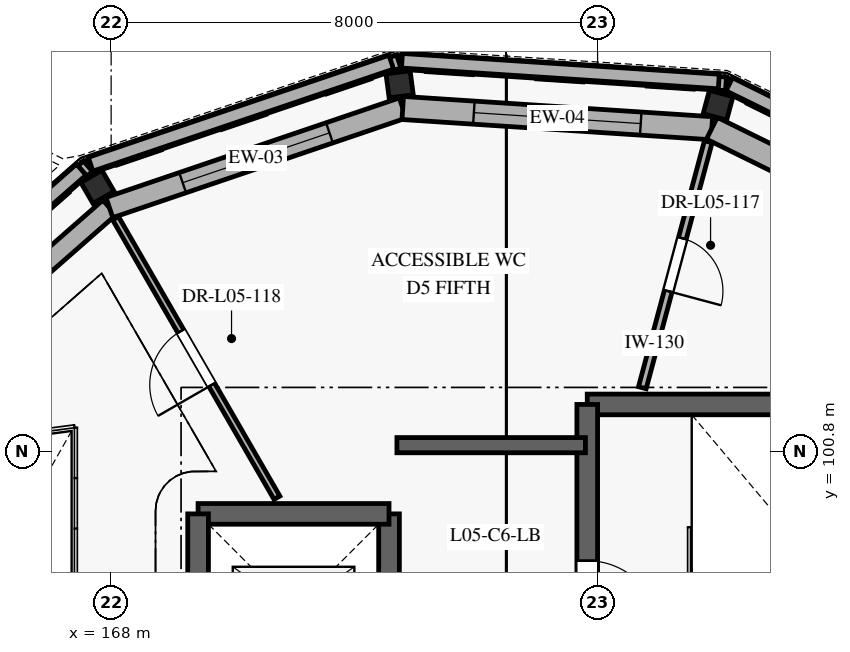
"""IFC4 building model, lengths in metres.
Left out: names, types, materials, properties, quantities, classifications, styles, units other than length and angle.
Written with IfcOpenShell. Run it as: python <this file> out.ifc"""

import sys

from ifc_helpers import new_model, si_unit, direction, frame, frame_2d, origin, origin_2d, place, context, subcontext, project, spatial, rectangle, extrude, element, fill, save


model = new_model("IFC4")
c1 = context("Model", 3, precision=1e-05, world=origin(), true_north=direction((0.0, 1.0)))
c2 = subcontext(c1, "Body", "Model", "MODEL_VIEW")
j1 = project(units=[si_unit("LENGTHUNIT", "METRE"), si_unit("PLANEANGLEUNIT", "RADIAN")], contexts=[c1])
p1 = place(None, origin())
s1 = spatial("IfcSite", under=j1, at=p1, CompositionType="ELEMENT")
p2 = place(p1, origin())
s2 = spatial("IfcBuilding", under=s1, at=p2, CompositionType="ELEMENT")
p3 = place(p2, frame((0.0, 0.0, 20.8)))
s3 = spatial("IfcBuildingStorey", under=s2, at=p3, CompositionType="ELEMENT", Elevation=20.8)
for number, where, z_axis, x_axis in (
    (1, (177.981, 106.492, 0.0), (0.0, 0.0, 1.0), (-0.966, 0.259, 0.0)),
    (2, (172.744, 106.835, 0.0), (0.0, 0.0, 1.0), (-0.991, -0.131, 0.0)),
    (3, (167.775, 105.148, 0.0), (0.0, 0.0, 1.0), (-0.866, -0.5, 0.0)),
):
    element("IfcColumn", number, at=place(p3, frame(where, z_axis=z_axis, x_axis=x_axis)), inside=s3, PredefinedType="COLUMN", context=c2, shape_type="SweptSolid", body=[
        extrude(rectangle(XDim=0.4, YDim=0.4, at=origin_2d()), origin(), (0.0, 0.0, 1.0), 4.0),
    ])
p4 = place(p3, frame((164.141, 101.449, 0.0), z_axis=(0.0, 0.0, 1.0), x_axis=(0.751857877577, 0.659325209533, 0.0)))
e4 = element("IfcWall", 4, at=p4, inside=s3, PredefinedType="SOLIDWALL", context=c2, shape_type="SweptSolid", body=[
    extrude(rectangle(XDim=5.095, YDim=0.325, at=frame_2d((2.547, 0.0))), origin(), (0.0, 0.0, 1.0), 3.74),
])
p5 = place(p4, frame((1.372, 0.0, 0.85)))
e5 = element("IfcOpeningElement", 5, at=p5, cuts=e4, PredefinedType="OPENING", context=c2, shape_type="SweptSolid", body=[
    extrude(rectangle(XDim=2.35, YDim=1.8, at=frame_2d((1.175, 0.9))), frame((0.0, 0.172, 0.0), z_axis=(0.0, -1.0, 0.0), x_axis=(1.0, 0.0, 0.0)), (0.0, 0.0, 1.0), 0.345),
])
p6 = place(p3, frame((167.971, 104.808, 0.0), z_axis=(0.0, 0.0, 1.0), x_axis=(0.946944067006, 0.321398403796, 0.0)))
e6 = element("IfcWall", 6, at=p6, inside=s3, PredefinedType="SOLIDWALL", context=c2, shape_type="SweptSolid", body=[
    extrude(rectangle(XDim=5.095, YDim=0.35, at=frame_2d((2.547, 0.0))), origin(), (0.0, 0.0, 1.0), 3.74),
])
p7 = place(p6, frame((1.272, 0.0, 0.85)))
e7 = element("IfcOpeningElement", 7, at=p7, cuts=e6, PredefinedType="OPENING", context=c2, shape_type="SweptSolid", body=[
    extrude(rectangle(XDim=2.55, YDim=1.8, at=frame_2d((1.275, 0.9))), frame((0.0, 0.185, 0.0), z_axis=(0.0, -1.0, 0.0), x_axis=(1.0, 0.0, 0.0)), (0.0, 0.0, 1.0), 0.37),
])
p8 = place(p3, frame((172.796, 106.446, 0.0), z_axis=(0.0, 0.0, 1.0), x_axis=(0.99786146052, -0.065364406289, 0.0)))
e8 = element("IfcWall", 8, at=p8, inside=s3, PredefinedType="SOLIDWALL", context=c2, shape_type="SweptSolid", body=[
    extrude(rectangle(XDim=5.095, YDim=0.38, at=frame_2d((2.547, 0.0))), origin(), (0.0, 0.0, 1.0), 3.007),
])
p9 = place(p8, frame((1.172, 0.0, 0.85)))
e9 = element("IfcOpeningElement", 9, at=p9, cuts=e8, PredefinedType="OPENING", context=c2, shape_type="SweptSolid", body=[
    extrude(rectangle(XDim=2.75, YDim=1.8, at=frame_2d((1.375, 0.9))), frame((0.0, 0.2, 0.0), z_axis=(0.0, -1.0, 0.0), x_axis=(1.0, 0.0, 0.0)), (0.0, 0.0, 1.0), 0.4),
])
p10 = place(p3, frame((177.879, 106.113, 0.0), z_axis=(0.0, 0.0, 1.0), x_axis=(0.896885971635, -0.442261861213, 0.0)))
e10 = element("IfcWall", 10, at=p10, inside=s3, PredefinedType="SOLIDWALL", context=c2, shape_type="SweptSolid", body=[
    extrude(rectangle(XDim=5.095, YDim=0.4, at=frame_2d((2.548, 0.0))), origin(), (0.0, 0.0, 1.0), 3.007),
])
p11 = place(p10, frame((1.948, 0.0, 0.85)))
e11 = element("IfcOpeningElement", 11, at=p11, cuts=e10, PredefinedType="OPENING", context=c2, shape_type="SweptSolid", body=[
    extrude(rectangle(XDim=1.2, YDim=1.15, at=frame_2d((0.6, 0.575))), frame((0.0, 0.21, 0.0), z_axis=(0.0, -1.0, 0.0), x_axis=(1.0, 0.0, 0.0)), (0.0, 0.0, 1.0), 0.42),
])
p12 = place(p3, frame((182.943, 104.446, 0.0), z_axis=(0.0, 0.0, 1.0), x_axis=(-0.896871842035, 0.442290514216, 0.0)))
e12 = element("IfcWall", 12, at=p12, inside=s3, PredefinedType="ELEMENTEDWALL", context=c2, shape_type="SweptSolid", body=[
    extrude(rectangle(XDim=5.462, YDim=0.225, at=frame_2d((2.731, 0.0))), origin(), (0.0, 0.0, 1.0), 1.09),
])
p13 = place(p3, frame((179.201, 106.291, 1.09), z_axis=(0.0, 0.0, 1.0), x_axis=(-0.896855160379, 0.442324339485, 0.0)))
e13 = element("IfcWall", 13, at=p13, inside=s3, PredefinedType="ELEMENTEDWALL", context=c2, shape_type="SweptSolid", body=[
    extrude(rectangle(XDim=0.76, YDim=0.245, at=frame_2d((0.38, 0.0))), origin(), (0.0, 0.0, 1.0), 2.65),
])
p14 = place(p3, frame((178.112, 106.844, 0.0), z_axis=(0.0, 0.0, 1.0), x_axis=(-0.997860057416, 0.065385822726, 0.0)))
e14 = element("IfcWall", 14, at=p14, inside=s3, PredefinedType="ELEMENTEDWALL", context=c2, shape_type="SweptSolid", body=[
    extrude(rectangle(XDim=5.463, YDim=0.225, at=frame_2d((2.731, 0.0))), origin(), (0.0, 0.0, 1.0), 1.09),
])
p15 = place(p3, frame((177.583, 106.878, 1.09), z_axis=(0.0, 0.0, 1.0), x_axis=(-0.997872390908, 0.065197327118, 0.0)))
e15 = element("IfcWall", 15, at=p15, inside=s3, PredefinedType="ELEMENTEDWALL", context=c2, shape_type="SweptSolid", body=[
    extrude(rectangle(XDim=0.76, YDim=0.245, at=frame_2d((0.38, 0.0))), origin(), (0.0, 0.0, 1.0), 2.65),
])
for number, where, z_axis, x_axis in (
    (16, (175.765, 106.997, 1.09), (0.0, 0.0, 1.0), (-0.998, 0.065, 0.0)),
    (17, (173.948, 107.116, 1.09), (0.0, 0.0, 1.0), (-0.998, 0.066, 0.0)),
):
    element("IfcWall", number, at=place(p3, frame(where, z_axis=z_axis, x_axis=x_axis)), inside=s3, PredefinedType="ELEMENTEDWALL", context=c2, shape_type="SweptSolid", body=[
        extrude(rectangle(XDim=0.76, YDim=0.245, at=frame_2d((0.38, 0.0))), origin(), (0.0, 0.0, 1.0), 2.65),
    ])
p16 = place(p3, frame((172.73, 107.21, 0.0), z_axis=(0.0, 0.0, 1.0), x_axis=(-0.946943969259, -0.321398691789, 0.0)))
e18 = element("IfcWall", 18, at=p16, inside=s3, PredefinedType="ELEMENTEDWALL", context=c2, shape_type="SweptSolid", body=[
    extrude(rectangle(XDim=5.462, YDim=0.225, at=frame_2d((2.731, 0.0))), origin(), (0.0, 0.0, 1.0), 1.09),
])
p17 = place(p3, frame((172.228, 107.039, 1.09), z_axis=(0.0, 0.0, 1.0), x_axis=(-0.946901886192, -0.321522655386, 0.0)))
e19 = element("IfcWall", 19, at=p17, inside=s3, PredefinedType="ELEMENTEDWALL", context=c2, shape_type="SweptSolid", body=[
    extrude(rectangle(XDim=0.76, YDim=0.245, at=frame_2d((0.38, 0.0))), origin(), (0.0, 0.0, 1.0), 2.65),
])
for number, where, z_axis, x_axis in (
    (20, (170.504, 106.454, 1.09), (0.0, 0.0, 1.0), (-0.947, -0.322, 0.0)),
    (21, (168.78, 105.869, 1.09), (0.0, 0.0, 1.0), (-0.947, -0.322, 0.0)),
):
    element("IfcWall", number, at=place(p3, frame(where, z_axis=z_axis, x_axis=x_axis)), inside=s3, PredefinedType="ELEMENTEDWALL", context=c2, shape_type="SweptSolid", body=[
        extrude(rectangle(XDim=0.76, YDim=0.245, at=frame_2d((0.38, 0.0))), origin(), (0.0, 0.0, 1.0), 2.65),
    ])
p18 = place(p3, frame((167.619, 105.489, 0.0), z_axis=(0.0, 0.0, 1.0), x_axis=(-0.751850842434, -0.659333231933, 0.0)))
e22 = element("IfcWall", 22, at=p18, inside=s3, PredefinedType="ELEMENTEDWALL", context=c2, shape_type="SweptSolid", body=[
    extrude(rectangle(XDim=5.462, YDim=0.225, at=frame_2d((2.731, 0.0))), origin(), (0.0, 0.0, 1.0), 1.09),
])
p19 = place(p3, frame((167.22, 105.139, 1.09), z_axis=(0.0, 0.0, 1.0), x_axis=(-0.751840109951, -0.659345470196, 0.0)))
e23 = element("IfcWall", 23, at=p19, inside=s3, PredefinedType="ELEMENTEDWALL", context=c2, shape_type="SweptSolid", body=[
    extrude(rectangle(XDim=0.76, YDim=0.245, at=frame_2d((0.38, 0.0))), origin(), (0.0, 0.0, 1.0), 2.65),
])
p20 = place(p3, frame((182.849, 104.525, 4.0), z_axis=(0.0, 0.0, 1.0), x_axis=(-0.896854104277, 0.442326480827, 0.0)))
e24 = element("IfcWall", 24, at=p20, inside=s3, PredefinedType="PARAPET", context=c2, shape_type="SweptSolid", body=[
    extrude(rectangle(XDim=5.222, YDim=0.24, at=frame_2d((2.611, 0.0))), origin(), (0.0, 0.0, 1.0), 1.12),
])
p21 = place(p3, frame((177.994, 106.881, 4.0), z_axis=(0.0, 0.0, 1.0), x_axis=(-0.997859200116, 0.065398904758, 0.0)))
e25 = element("IfcWall", 25, at=p21, inside=s3, PredefinedType="PARAPET", context=c2, shape_type="SweptSolid", body=[
    extrude(rectangle(XDim=5.223, YDim=0.24, at=frame_2d((2.611, 0.0))), origin(), (0.0, 0.0, 1.0), 1.12),
])
p22 = place(p3, frame((172.607, 107.2, 4.0), z_axis=(0.0, 0.0, 1.0), x_axis=(-0.946929922709, -0.321440074474, 0.0)))
e26 = element("IfcWall", 26, at=p22, inside=s3, PredefinedType="PARAPET", context=c2, shape_type="SweptSolid", body=[
    extrude(rectangle(XDim=5.222, YDim=0.24, at=frame_2d((2.611, 0.0))), origin(), (0.0, 0.0, 1.0), 1.12),
])
p23 = place(p3, frame((167.509, 105.433, 4.0), z_axis=(0.0, 0.0, 1.0), x_axis=(-0.751826191912, -0.659361340355, 0.0)))
e27 = element("IfcWall", 27, at=p23, inside=s3, PredefinedType="PARAPET", context=c2, shape_type="SweptSolid", body=[
    extrude(rectangle(XDim=5.223, YDim=0.24, at=frame_2d((2.611, 0.0))), origin(), (0.0, 0.0, 1.0), 1.12),
])
p24 = place(p3, frame((182.77, 101.57, 0.0), z_axis=(0.0, 0.0, 1.0), x_axis=(-1.0, 0.0, 0.0)))
e28 = element("IfcWall", 28, at=p24, inside=s3, PredefinedType="SHEAR", context=c2, shape_type="SweptSolid", body=[
    extrude(rectangle(XDim=6.94, YDim=0.34, at=frame_2d((3.47, 0.0))), origin(), (0.0, 0.0, 1.0), 3.75),
])
p25 = place(p3, frame((175.83, 101.57, 0.0), z_axis=(0.0, 0.0, 1.0), x_axis=(0.0, -1.0, 0.0)))
e29 = element("IfcWall", 29, at=p25, inside=s3, PredefinedType="SHEAR", context=c2, shape_type="SweptSolid", body=[
    extrude(rectangle(XDim=6.34, YDim=0.34, at=frame_2d((3.17, 0.0))), origin(), (0.0, 0.0, 1.0), 3.75),
])
p26 = place(p25, frame((2.57, 0.0, 0.0)))
e30 = element("IfcOpeningElement", 30, at=p26, cuts=e29, PredefinedType="OPENING", context=c2, shape_type="SweptSolid", body=[
    extrude(rectangle(XDim=1.2, YDim=2.1, at=frame_2d((0.6, 1.05))), frame((0.0, 0.18, 0.0), z_axis=(0.0, -1.0, 0.0), x_axis=(1.0, 0.0, 0.0)), (0.0, 0.0, 1.0), 0.36),
])
p27 = place(p3, frame((172.57, 96.63, 0.0), z_axis=(0.0, 0.0, 1.0), x_axis=(0.0, 1.0, 0.0)))
e31 = element("IfcWall", 31, at=p27, inside=s3, PredefinedType="SHEAR", context=c2, shape_type="SweptSolid", body=[
    extrude(rectangle(XDim=3.14, YDim=0.34, at=frame_2d((1.57, 0.0))), origin(), (0.0, 0.0, 1.0), 3.75),
])
p28 = place(p27, frame((1.02, 0.0, 0.0)))
e32 = element("IfcOpeningElement", 32, at=p28, cuts=e31, PredefinedType="OPENING", context=c2, shape_type="SweptSolid", body=[
    extrude(rectangle(XDim=1.1, YDim=2.1, at=frame_2d((0.55, 1.05))), frame((0.0, 0.18, 0.0), z_axis=(0.0, -1.0, 0.0), x_axis=(1.0, 0.0, 0.0)), (0.0, 0.0, 1.0), 0.36),
])
for number, where, z_axis, x_axis in (
    (33, (172.57, 99.77, 0.0), (0.0, 0.0, 1.0), (-1.0, 0.0, 0.0)),
    (34, (169.43, 99.77, 0.0), (0.0, 0.0, 1.0), (0.0, -1.0, 0.0)),
):
    element("IfcWall", number, at=place(p3, frame(where, z_axis=z_axis, x_axis=x_axis)), inside=s3, PredefinedType="SHEAR", context=c2, shape_type="SweptSolid", body=[
        extrude(rectangle(XDim=3.14, YDim=0.34, at=frame_2d((1.57, 0.0))), origin(), (0.0, 0.0, 1.0), 3.75),
    ])
p29 = place(p3, frame((175.8, 100.9, 0.0), z_axis=(0.0, 0.0, 1.0), x_axis=(-1.0, 0.0, 0.0)))
e35 = element("IfcWall", 35, at=p29, inside=s3, PredefinedType="SHEAR", context=c2, shape_type="SweptSolid", body=[
    extrude(rectangle(XDim=3.1, YDim=0.25, at=frame_2d((1.55, 0.0))), origin(), (0.0, 0.0, 1.0), 3.75),
])
p30 = place(p3, frame((170.727, 100.035, 0.0), z_axis=(0.0, 0.0, 1.0), x_axis=(-0.500022392924, 0.866012474838, 0.0)))
e36 = element("IfcWall", 36, at=p30, inside=s3, PredefinedType="PARTITIONING", context=c2, shape_type="SweptSolid", body=[
    extrude(rectangle(XDim=5.308, YDim=0.11, at=frame_2d((2.654, 0.0))), origin(), (0.0, 0.0, 1.0), 3.75),
])
p31 = place(p30, frame((2.144, 0.0, 0.0)))
e37 = element("IfcOpeningElement", 37, at=p31, cuts=e36, PredefinedType="OPENING", context=c2, shape_type="SweptSolid", body=[
    extrude(rectangle(XDim=1.02, YDim=2.06, at=frame_2d((0.51, 1.03))), frame((0.0, 0.065, 0.0), z_axis=(0.0, -1.0, 0.0), x_axis=(1.0, 0.0, 0.0)), (0.0, 0.0, 1.0), 0.13),
])
p32 = place(p3, frame((177.82, 105.891, 0.0), z_axis=(0.0, 0.0, 1.0), x_axis=(-0.258834164174, -0.965921775019, 0.0)))
e38 = element("IfcWall", 38, at=p32, inside=s3, PredefinedType="PARTITIONING", context=c2, shape_type="SweptSolid", body=[
    extrude(rectangle(XDim=4.189, YDim=0.13, at=frame_2d((2.094, 0.0))), origin(), (0.0, 0.0, 1.0), 3.75),
])
p33 = place(p32, frame((1.644, 0.0, 0.0)))
e39 = element("IfcOpeningElement", 39, at=p33, cuts=e38, PredefinedType="OPENING", context=c2, shape_type="SweptSolid", body=[
    extrude(rectangle(XDim=0.9, YDim=2.05, at=frame_2d((0.45, 1.025))), frame((0.0, 0.075, 0.0), z_axis=(0.0, -1.0, 0.0), x_axis=(1.0, 0.0, 0.0)), (0.0, 0.0, 1.0), 0.15),
])
p34 = place(p7, origin())
e40 = element("IfcWindow", 40, at=p34, inside=s3, PartitioningType="SINGLE_PANEL", PredefinedType="WINDOW", context=c2, shape_type="SweptSolid", body=[
    extrude(rectangle(XDim=2.55, YDim=1.8, at=frame_2d((1.275, 0.9))), frame((0.0, 0.03, 0.0), z_axis=(0.0, -1.0, 0.0), x_axis=(1.0, 0.0, 0.0)), (0.0, 0.0, 1.0), 0.06),
])
fill(e7, e40)
p35 = place(p9, origin())
e41 = element("IfcWindow", 41, at=p35, inside=s3, PartitioningType="SINGLE_PANEL", PredefinedType="WINDOW", context=c2, shape_type="SweptSolid", body=[
    extrude(rectangle(XDim=2.75, YDim=1.8, at=frame_2d((1.375, 0.9))), frame((0.0, 0.03, 0.0), z_axis=(0.0, -1.0, 0.0), x_axis=(1.0, 0.0, 0.0)), (0.0, 0.0, 1.0), 0.06),
])
fill(e9, e41)
p36 = place(p26, origin())
e42 = element("IfcDoor", 42, at=p36, inside=s3, OperationType="SINGLE_SWING_RIGHT", PredefinedType="DOOR", context=c2, shape_type="SweptSolid", body=[
    extrude(rectangle(XDim=1.2, YDim=2.1, at=frame_2d((0.6, 1.05))), frame((0.0, 0.025, 0.0), z_axis=(0.0, -1.0, 0.0), x_axis=(1.0, 0.0, 0.0)), (0.0, 0.0, 1.0), 0.05),
])
fill(e30, e42)
p37 = place(p33, origin())
e43 = element("IfcDoor", 43, at=p37, inside=s3, OperationType="SINGLE_SWING_RIGHT", PredefinedType="DOOR", context=c2, shape_type="SweptSolid", body=[
    extrude(rectangle(XDim=0.9, YDim=2.05, at=frame_2d((0.45, 1.025))), frame((0.0, 0.025, 0.0), z_axis=(0.0, -1.0, 0.0), x_axis=(1.0, 0.0, 0.0)), (0.0, 0.0, 1.0), 0.05),
])
fill(e39, e43)
p38 = place(p31, origin())
e44 = element("IfcDoor", 44, at=p38, inside=s3, OperationType="SINGLE_SWING_LEFT", PredefinedType="DOOR", context=c2, shape_type="SweptSolid", body=[
    extrude(rectangle(XDim=1.02, YDim=2.06, at=frame_2d((0.51, 1.03))), frame((0.0, 0.025, 0.0), z_axis=(0.0, -1.0, 0.0), x_axis=(1.0, 0.0, 0.0)), (0.0, 0.0, 1.0), 0.05),
])
fill(e37, e44)
save(model, sys.argv[1])
